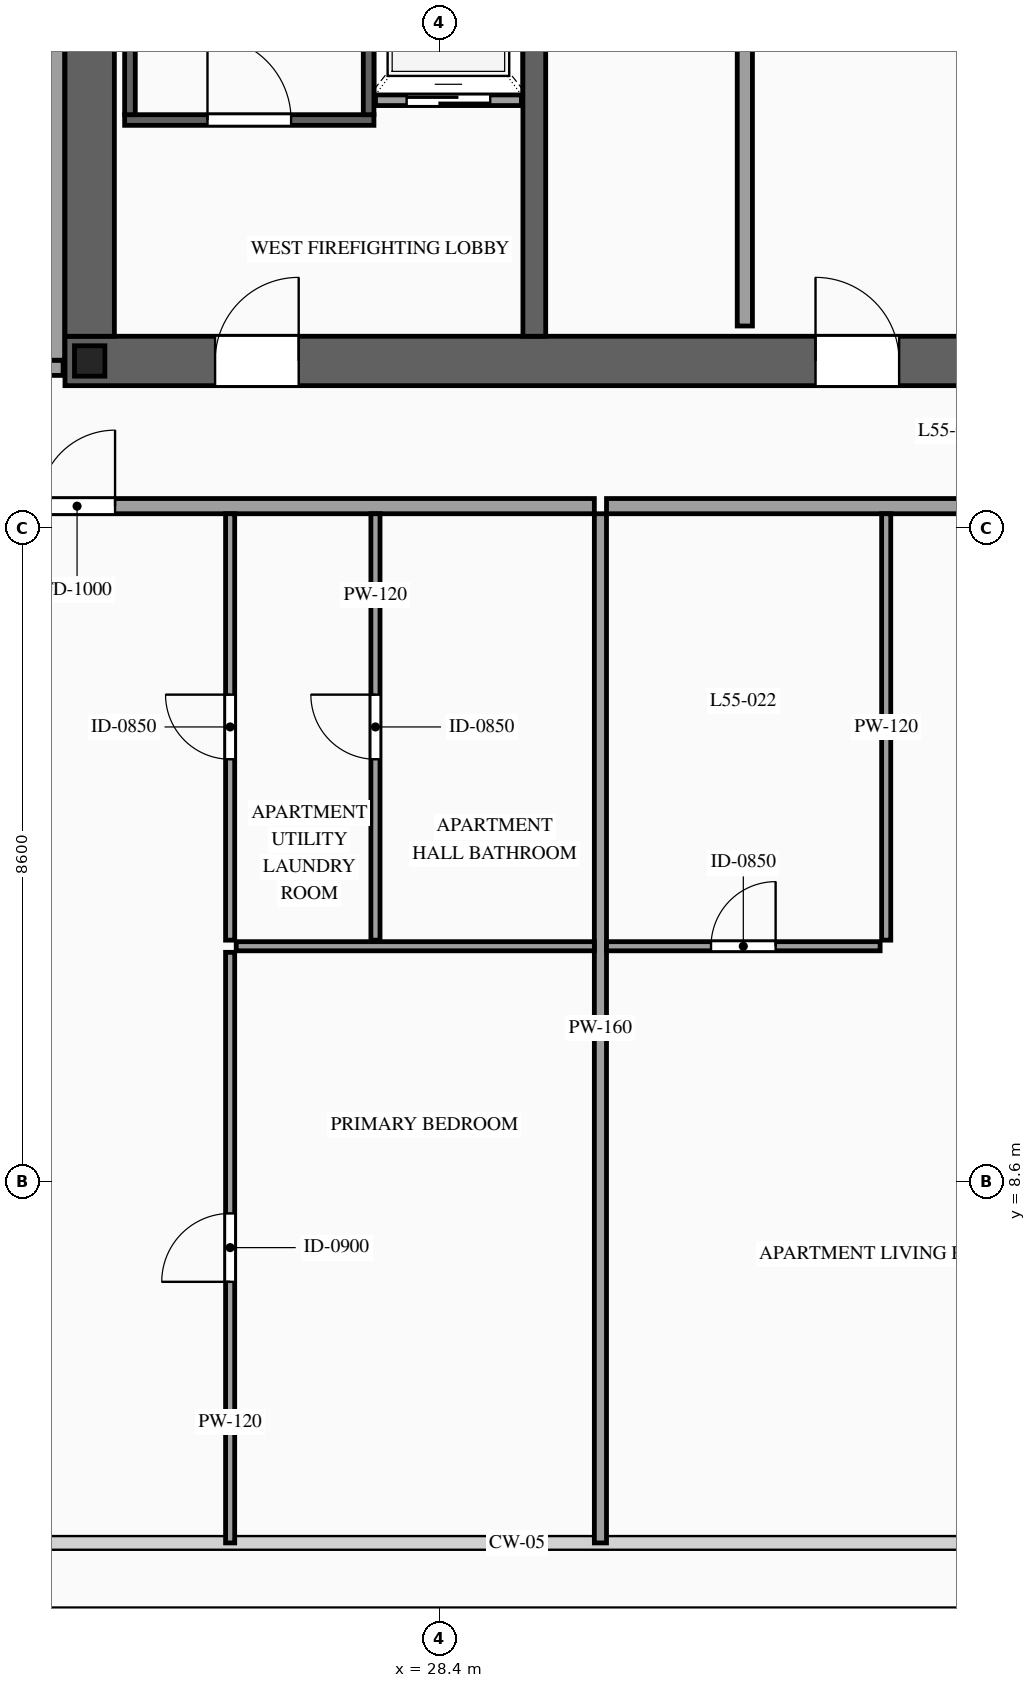
"""IFC4 building model, lengths in metres.
Left out: names, types, materials, properties, quantities, classifications, styles, units other than length and angle.
Written with IfcOpenShell. Run it as: python <this file> out.ifc"""

import sys

from ifc_helpers import new_model, si_unit, direction, frame, frame_2d, origin, origin_2d, place, context, subcontext, project, spatial, rectangle, i_section, extrude, source, transform, mapped, element, fill, save


model = new_model("IFC4")
c1 = context("Model", 3, precision=1e-05, world=origin(), true_north=direction((0.0, 1.0)))
c2 = subcontext(c1, "Body", "Model", "MODEL_VIEW")
j1 = project(units=[si_unit("LENGTHUNIT", "METRE"), si_unit("PLANEANGLEUNIT", "RADIAN")], contexts=[c1])
p1 = place(None, origin())
s1 = spatial("IfcSite", under=j1, at=p1, CompositionType="ELEMENT")
p2 = place(p1, origin())
s2 = spatial("IfcBuilding", under=s1, at=p2, CompositionType="ELEMENT")
p3 = place(p2, frame((0.0, 0.0, 209.0)))
s3 = spatial("IfcBuildingStorey", under=s2, at=p3, CompositionType="ELEMENT", Elevation=209.0)
p4 = place(p3, frame((23.475, 19.4, 0.0), z_axis=(0.0, 0.0, 1.0), x_axis=(1.0, 0.0, 0.0)))
e1 = element("IfcWall", 1, at=p4, inside=s3, PredefinedType="SHEAR", context=c2, shape_type="SweptSolid", body=[
    extrude(rectangle(XDim=27.05, YDim=0.65, at=frame_2d((13.525, 0.0))), origin(), (0.0, 0.0, 1.0), 3.5),
])
p5 = place(p4, frame((1.975, 0.0, 0.0)))
e2 = element("IfcOpeningElement", 2, at=p5, cuts=e1, PredefinedType="OPENING", context=c2, shape_type="SweptSolid", body=[
    extrude(rectangle(XDim=1.1, YDim=2.2, at=frame_2d((0.55, 1.1))), frame((0.0, 0.34, 0.0), z_axis=(0.0, -1.0, 0.0), x_axis=(1.0, 0.0, 0.0)), (0.0, 0.0, 1.0), 0.68),
])
p6 = place(p4, frame((9.875, 0.0, 0.0)))
e3 = element("IfcOpeningElement", 3, at=p6, cuts=e1, PredefinedType="OPENING", context=c2, shape_type="SweptSolid", body=[
    extrude(rectangle(XDim=1.1, YDim=2.2, at=frame_2d((0.55, 1.1))), frame((0.0, 0.34, 0.0), z_axis=(0.0, -1.0, 0.0), x_axis=(1.0, 0.0, 0.0)), (0.0, 0.0, 1.0), 0.68),
])
p7 = place(p4, frame((23.075, 0.0, 0.0)))
e4 = element("IfcOpeningElement", 4, at=p7, cuts=e1, PredefinedType="OPENING", context=c2, shape_type="SweptSolid", body=[
    extrude(rectangle(XDim=1.1, YDim=2.2, at=frame_2d((0.55, 1.1))), frame((0.0, 0.34, 0.0), z_axis=(0.0, -1.0, 0.0), x_axis=(1.0, 0.0, 0.0)), (0.0, 0.0, 1.0), 0.68),
])
p8 = place(p4, frame((19.695, 0.0, 0.0)))
e5 = element("IfcOpeningElement", 5, at=p8, cuts=e1, PredefinedType="OPENING", context=c2, shape_type="SweptSolid", body=[
    extrude(rectangle(XDim=0.9, YDim=2.15, at=frame_2d((0.45, 1.075))), frame((0.0, 0.34, 0.0), z_axis=(0.0, -1.0, 0.0), x_axis=(1.0, 0.0, 0.0)), (0.0, 0.0, 1.0), 0.68),
])
p9 = place(p4, frame((18.255, 0.0, 0.0)))
e6 = element("IfcOpeningElement", 6, at=p9, cuts=e1, PredefinedType="OPENING", context=c2, shape_type="SweptSolid", body=[
    extrude(rectangle(XDim=0.9, YDim=2.15, at=frame_2d((0.45, 1.075))), frame((0.0, 0.34, 0.0), z_axis=(0.0, -1.0, 0.0), x_axis=(1.0, 0.0, 0.0)), (0.0, 0.0, 1.0), 0.68),
])
m1 = source(origin(), c2, "Body", "SweptSolid", [
    extrude(rectangle(XDim=12.15, YDim=0.65, at=frame_2d((6.075, 0.0))), origin(), (0.0, 0.0, 1.0), 3.5),
])
p10 = place(p3, frame((23.8, 19.725, 0.0), z_axis=(0.0, 0.0, 1.0), x_axis=(0.0, 1.0, 0.0)))
e7 = element("IfcWall", 7, at=p10, inside=s3, PredefinedType="SHEAR", context=c2, shape_type="MappedRepresentation", body=[
    mapped(m1, transform((0.0, 0.0, 0.0), scale=1.0)),
])
m2 = source(origin(), c2, "Body", "SweptSolid", [
    extrude(rectangle(XDim=12.15, YDim=0.3, at=frame_2d((6.075, 0.0))), origin(), (0.0, 0.0, 1.0), 3.5),
])
p11 = place(p3, frame((29.65, 19.725, 0.0), z_axis=(0.0, 0.0, 1.0), x_axis=(0.0, 1.0, 0.0)))
e8 = element("IfcWall", 8, at=p11, inside=s3, PredefinedType="SOLIDWALL", context=c2, shape_type="MappedRepresentation", body=[
    mapped(m2, transform((0.0, 0.0, 0.0), scale=1.0)),
])
m3 = source(origin(), c2, "Body", "SweptSolid", [
    extrude(i_section(OverallWidth=0.4, OverallDepth=0.4, WebThickness=0.013, FlangeThickness=0.021, at=origin_2d()), origin(), (0.0, 0.0, 1.0), 3.5),
])
p12 = place(p3, frame((23.8, 19.4, 0.0), z_axis=(0.0, 0.0, 1.0), x_axis=(1.0, 0.0, 0.0)))
e9 = element("IfcColumn", 9, at=p12, inside=s3, PredefinedType="COLUMN", context=c2, shape_type="MappedRepresentation", body=[
    mapped(m3, transform((0.0, 0.0, 0.0), scale=1.0)),
])
p13 = place(p3, frame((27.56, 22.83, 0.0), z_axis=(0.0, 0.0, 1.0), x_axis=(1.0, 0.0, 0.0)))
e10 = element("IfcWall", 10, at=p13, inside=s3, PredefinedType="SOLIDWALL", context=c2, shape_type="SweptSolid", body=[
    extrude(rectangle(XDim=1.92, YDim=0.14, at=frame_2d((0.96, 0.0))), origin(), (0.0, 0.0, 1.0), 3.28),
])
p14 = place(p13, frame((0.41, 0.0, 0.0)))
e11 = element("IfcOpeningElement", 11, at=p14, cuts=e10, PredefinedType="OPENING", context=c2, shape_type="SweptSolid", body=[
    extrude(rectangle(XDim=1.1, YDim=2.2, at=frame_2d((0.55, 1.1))), frame((0.0, 0.085, 0.0), z_axis=(0.0, -1.0, 0.0), x_axis=(1.0, 0.0, 0.0)), (0.0, 0.0, 1.0), 0.17),
])
p15 = place(p3, frame((24.26, 22.57, 0.0), z_axis=(0.0, 0.0, 1.0), x_axis=(1.0, 0.0, 0.0)))
e12 = element("IfcWall", 12, at=p15, inside=s3, PredefinedType="SOLIDWALL", context=c2, shape_type="SweptSolid", body=[
    extrude(rectangle(XDim=3.28, YDim=0.14, at=frame_2d((1.64, 0.0))), origin(), (0.0, 0.0, 1.0), 3.28),
])
p16 = place(p15, frame((1.09, 0.0, 0.0)))
e13 = element("IfcOpeningElement", 13, at=p16, cuts=e12, PredefinedType="OPENING", context=c2, shape_type="SweptSolid", body=[
    extrude(rectangle(XDim=1.1, YDim=2.2, at=frame_2d((0.55, 1.1))), frame((0.0, 0.085, 0.0), z_axis=(0.0, -1.0, 0.0), x_axis=(1.0, 0.0, 0.0)), (0.0, 0.0, 1.0), 0.17),
])
m4 = source(origin(), c2, "Body", "SweptSolid", [
    extrude(rectangle(XDim=8.94, YDim=0.14, at=frame_2d((4.47, 0.0))), origin(), (0.0, 0.0, 1.0), 3.28),
])
for number, where, z_axis, x_axis in (
    (14, (24.33, 22.64, 0.0), (0.0, 0.0, 1.0), (0.0, 1.0, 0.0)),
    (15, (27.47, 22.64, 0.0), (0.0, 0.0, 1.0), (0.0, 1.0, 0.0)),
):
    element("IfcWall", number, at=place(p3, frame(where, z_axis=z_axis, x_axis=x_axis)), inside=s3, PredefinedType="SOLIDWALL", context=c2, shape_type="MappedRepresentation", body=[
        mapped(m4, transform((0.0, 0.0, 0.0), scale=1.0)),
    ])
p17 = place(p3, frame((32.42, 19.86, 0.0), z_axis=(0.0, 0.0, 1.0), x_axis=(0.0, 1.0, 0.0)))
e16 = element("IfcWall", 16, at=p17, inside=s3, PredefinedType="PARTITIONING", context=c2, shape_type="SweptSolid", body=[
    extrude(rectangle(XDim=11.88, YDim=0.2, at=frame_2d((5.94, 0.0))), origin(), (0.0, 0.0, 1.0), 3.28),
])
p18 = place(p17, frame((5.49, 0.0, 0.0)))
e17 = element("IfcOpeningElement", 17, at=p18, cuts=e16, PredefinedType="OPENING", context=c2, shape_type="SweptSolid", body=[
    extrude(rectangle(XDim=0.9, YDim=2.15, at=frame_2d((0.45, 1.075))), frame((0.0, 0.115, 0.0), z_axis=(0.0, -1.0, 0.0), x_axis=(1.0, 0.0, 0.0)), (0.0, 0.0, 1.0), 0.23),
])
p19 = place(p3, frame((17.94, 17.49, 0.0), z_axis=(0.0, 0.0, 1.0), x_axis=(1.0, 0.0, 0.0)))
e18 = element("IfcWall", 18, at=p19, inside=s3, PredefinedType="PARTITIONING", context=c2, shape_type="SweptSolid", body=[
    extrude(rectangle(XDim=12.5, YDim=0.2, at=frame_2d((6.25, 0.0))), origin(), (0.0, 0.0, 1.0), 3.28),
])
p20 = place(p19, frame((5.194, 0.0, 0.0)))
e19 = element("IfcOpeningElement", 19, at=p20, cuts=e18, PredefinedType="OPENING", context=c2, shape_type="SweptSolid", body=[
    extrude(rectangle(XDim=1.0, YDim=2.2, at=frame_2d((0.5, 1.1))), frame((0.0, 0.115, 0.0), z_axis=(0.0, -1.0, 0.0), x_axis=(1.0, 0.0, 0.0)), (0.0, 0.0, 1.0), 0.23),
])
m5 = source(origin(), c2, "Body", "SweptSolid", [
    extrude(rectangle(XDim=13.54, YDim=0.16, at=frame_2d((6.77, 0.0))), origin(), (0.0, 0.0, 1.0), 3.28),
])
p21 = place(p3, frame((30.52, 3.85, 0.0), z_axis=(0.0, 0.0, 1.0), x_axis=(0.0, 1.0, 0.0)))
e20 = element("IfcWall", 20, at=p21, inside=s3, PredefinedType="PARTITIONING", context=c2, shape_type="MappedRepresentation", body=[
    mapped(m5, transform((0.0, 0.0, 0.0), scale=1.0)),
])
p22 = place(p3, frame((27.56, 11.78, 0.0), z_axis=(0.0, 0.0, 1.0), x_axis=(0.0, 1.0, 0.0)))
e21 = element("IfcWall", 21, at=p22, inside=s3, PredefinedType="PARTITIONING", context=c2, shape_type="SweptSolid", body=[
    extrude(rectangle(XDim=5.61, YDim=0.12, at=frame_2d((2.805, 0.0))), origin(), (0.0, 0.0, 1.0), 3.28),
])
p23 = place(p22, frame((2.38, 0.0, 0.0)))
e22 = element("IfcOpeningElement", 22, at=p23, cuts=e21, PredefinedType="OPENING", context=c2, shape_type="SweptSolid", body=[
    extrude(rectangle(XDim=0.85, YDim=2.1, at=frame_2d((0.425, 1.05))), frame((0.0, 0.075, 0.0), z_axis=(0.0, -1.0, 0.0), x_axis=(1.0, 0.0, 0.0)), (0.0, 0.0, 1.0), 0.15),
])
m6 = source(origin(), c2, "Body", "SweptSolid", [
    extrude(rectangle(XDim=4.712, YDim=0.12, at=frame_2d((2.356, 0.0))), origin(), (0.0, 0.0, 1.0), 2.875),
])
p24 = place(p3, frame((25.728, 11.7, 0.0), z_axis=(0.0, 0.0, 1.0), x_axis=(1.0, 0.0, 0.0)))
e23 = element("IfcWall", 23, at=p24, inside=s3, PredefinedType="PARTITIONING", context=c2, shape_type="MappedRepresentation", body=[
    mapped(m6, transform((0.0, 0.0, 0.0), scale=1.0)),
])
p25 = place(p3, frame((25.648, 3.85, 0.0), z_axis=(0.0, 0.0, 1.0), x_axis=(0.0, 1.0, 0.0)))
e24 = element("IfcWall", 24, at=p25, inside=s3, PredefinedType="PARTITIONING", context=c2, shape_type="SweptSolid", body=[
    extrude(rectangle(XDim=7.77, YDim=0.12, at=frame_2d((3.885, 0.0))), origin(), (0.0, 0.0, 1.0), 3.28),
])
p26 = place(p25, frame((3.435, 0.0, 0.0)))
e25 = element("IfcOpeningElement", 25, at=p26, cuts=e24, PredefinedType="OPENING", context=c2, shape_type="SweptSolid", body=[
    extrude(rectangle(XDim=0.9, YDim=2.15, at=frame_2d((0.45, 1.075))), frame((0.0, 0.075, 0.0), z_axis=(0.0, -1.0, 0.0), x_axis=(1.0, 0.0, 0.0)), (0.0, 0.0, 1.0), 0.15),
])
p27 = place(p3, frame((25.648, 11.78, 0.0), z_axis=(0.0, 0.0, 1.0), x_axis=(0.0, 1.0, 0.0)))
e26 = element("IfcWall", 26, at=p27, inside=s3, PredefinedType="PARTITIONING", context=c2, shape_type="SweptSolid", body=[
    extrude(rectangle(XDim=5.61, YDim=0.12, at=frame_2d((2.805, 0.0))), origin(), (0.0, 0.0, 1.0), 3.28),
])
p28 = place(p27, frame((2.38, 0.0, 0.0)))
e27 = element("IfcOpeningElement", 27, at=p28, cuts=e26, PredefinedType="OPENING", context=c2, shape_type="SweptSolid", body=[
    extrude(rectangle(XDim=0.85, YDim=2.1, at=frame_2d((0.425, 1.05))), frame((0.0, 0.075, 0.0), z_axis=(0.0, -1.0, 0.0), x_axis=(1.0, 0.0, 0.0)), (0.0, 0.0, 1.0), 0.15),
])
p29 = place(p3, frame((30.6, 17.49, 0.0), z_axis=(0.0, 0.0, 1.0), x_axis=(1.0, 0.0, 0.0)))
e28 = element("IfcWall", 28, at=p29, inside=s3, PredefinedType="PARTITIONING", context=c2, shape_type="SweptSolid", body=[
    extrude(rectangle(XDim=12.8, YDim=0.2, at=frame_2d((6.4, 0.0))), origin(), (0.0, 0.0, 1.0), 3.28),
])
p30 = place(p29, frame((5.344, 0.0, 0.0)))
e29 = element("IfcOpeningElement", 29, at=p30, cuts=e28, PredefinedType="OPENING", context=c2, shape_type="SweptSolid", body=[
    extrude(rectangle(XDim=1.0, YDim=2.2, at=frame_2d((0.5, 1.1))), frame((0.0, 0.115, 0.0), z_axis=(0.0, -1.0, 0.0), x_axis=(1.0, 0.0, 0.0)), (0.0, 0.0, 1.0), 0.23),
])
p31 = place(p3, frame((30.6, 11.7, 0.0), z_axis=(0.0, 0.0, 1.0), x_axis=(1.0, 0.0, 0.0)))
e30 = element("IfcWall", 30, at=p31, inside=s3, PredefinedType="PARTITIONING", context=c2, shape_type="SweptSolid", body=[
    extrude(rectangle(XDim=3.6, YDim=0.12, at=frame_2d((1.8, 0.0))), origin(), (0.0, 0.0, 1.0), 2.875),
])
p32 = place(p31, frame((1.375, 0.0, 0.0)))
e31 = element("IfcOpeningElement", 31, at=p32, cuts=e30, PredefinedType="OPENING", context=c2, shape_type="SweptSolid", body=[
    extrude(rectangle(XDim=0.85, YDim=2.1, at=frame_2d((0.425, 1.05))), frame((0.0, 0.075, 0.0), z_axis=(0.0, -1.0, 0.0), x_axis=(1.0, 0.0, 0.0)), (0.0, 0.0, 1.0), 0.15),
])
m7 = source(origin(), c2, "Body", "SweptSolid", [
    extrude(rectangle(XDim=5.61, YDim=0.12, at=frame_2d((2.805, 0.0))), origin(), (0.0, 0.0, 1.0), 3.28),
])
p33 = place(p3, frame((34.28, 11.78, 0.0), z_axis=(0.0, 0.0, 1.0), x_axis=(0.0, 1.0, 0.0)))
e32 = element("IfcWall", 32, at=p33, inside=s3, PredefinedType="PARTITIONING", context=c2, shape_type="MappedRepresentation", body=[
    mapped(m7, transform((0.0, 0.0, 0.0), scale=1.0)),
])
m8 = source(origin(), c2, "Body", "SweptSolid", [
    extrude(rectangle(XDim=8.4, YDim=0.2, at=frame_2d((4.2, 0.0))), origin(), (0.0, 0.0, 1.0), 2.775),
])
p34 = place(p3, frame((15.05, 19.31, 0.0), z_axis=(0.0, 0.0, 1.0), x_axis=(1.0, 0.0, 0.0)))
e33 = element("IfcWall", 33, at=p34, inside=s3, PredefinedType="PARTITIONING", context=c2, shape_type="MappedRepresentation", body=[
    mapped(m8, transform((0.0, 0.0, 0.0), scale=1.0)),
])
m9 = source(origin(), c2, "Body", "SweptSolid", [
    extrude(rectangle(XDim=12.78, YDim=0.2, at=frame_2d((6.39, 0.0))), origin(), (0.0, 0.0, 1.0), 3.28),
])
p35 = place(p3, frame((23.37, 19.41, 0.0), z_axis=(0.0, 0.0, 1.0), x_axis=(0.0, 1.0, 0.0)))
e34 = element("IfcWall", 34, at=p35, inside=s3, PredefinedType="PARTITIONING", context=c2, shape_type="MappedRepresentation", body=[
    mapped(m9, transform((0.0, 0.0, 0.0), scale=1.0)),
])
m10 = source(origin(), c2, "Body", "SweptSolid", [
    extrude(rectangle(XDim=1.1, YDim=2.2, at=frame_2d((0.55, 1.1))), frame((0.0, 0.025, 0.0), z_axis=(0.0, -1.0, 0.0), x_axis=(1.0, 0.0, 0.0)), (0.0, 0.0, 1.0), 0.05),
])
p36 = place(p14, origin())
e35 = element("IfcDoor", 35, at=p36, inside=s3, OperationType="SLIDING_TO_LEFT", PredefinedType="DOOR", context=c2, shape_type="MappedRepresentation", body=[
    mapped(m10, transform((0.0, 0.0, 0.0), scale=1.0)),
])
fill(e11, e35)
m11 = source(origin(), c2, "Body", "SweptSolid", [
    extrude(rectangle(XDim=1.1, YDim=2.2, at=frame_2d((0.55, 1.1))), frame((0.0, 0.025, 0.0), z_axis=(0.0, -1.0, 0.0), x_axis=(1.0, 0.0, 0.0)), (0.0, 0.0, 1.0), 0.05),
])
p37 = place(p16, origin())
e36 = element("IfcDoor", 36, at=p37, inside=s3, OperationType="SINGLE_SWING_LEFT", PredefinedType="DOOR", context=c2, shape_type="MappedRepresentation", body=[
    mapped(m11, transform((0.0, 0.0, 0.0), scale=1.0)),
])
fill(e13, e36)
p38 = place(p5, origin())
e37 = element("IfcDoor", 37, at=p38, inside=s3, OperationType="SINGLE_SWING_RIGHT", PredefinedType="DOOR", context=c2, shape_type="MappedRepresentation", body=[
    mapped(m11, transform((0.0, 0.0, 0.0), scale=1.0)),
])
fill(e2, e37)
p39 = place(p6, origin())
e38 = element("IfcDoor", 38, at=p39, inside=s3, OperationType="SINGLE_SWING_LEFT", PredefinedType="DOOR", context=c2, shape_type="MappedRepresentation", body=[
    mapped(m11, transform((0.0, 0.0, 0.0), scale=1.0)),
])
fill(e3, e38)
m12 = source(origin(), c2, "Body", "SweptSolid", [
    extrude(rectangle(XDim=1.0, YDim=2.2, at=frame_2d((0.5, 1.1))), frame((0.0, 0.025, 0.0), z_axis=(0.0, -1.0, 0.0), x_axis=(1.0, 0.0, 0.0)), (0.0, 0.0, 1.0), 0.05),
])
p40 = place(p20, origin())
e39 = element("IfcDoor", 39, at=p40, inside=s3, OperationType="SINGLE_SWING_RIGHT", PredefinedType="DOOR", context=c2, shape_type="MappedRepresentation", body=[
    mapped(m12, transform((0.0, 0.0, 0.0), scale=1.0)),
])
fill(e19, e39)
m13 = source(origin(), c2, "Body", "SweptSolid", [
    extrude(rectangle(XDim=0.85, YDim=2.1, at=frame_2d((0.425, 1.05))), frame((0.0, 0.025, 0.0), z_axis=(0.0, -1.0, 0.0), x_axis=(1.0, 0.0, 0.0)), (0.0, 0.0, 1.0), 0.05),
])
p41 = place(p23, origin())
e40 = element("IfcDoor", 40, at=p41, inside=s3, OperationType="SINGLE_SWING_RIGHT", PredefinedType="DOOR", context=c2, shape_type="MappedRepresentation", body=[
    mapped(m13, transform((0.0, 0.0, 0.0), scale=1.0)),
])
fill(e22, e40)
m14 = source(origin(), c2, "Body", "SweptSolid", [
    extrude(rectangle(XDim=0.9, YDim=2.15, at=frame_2d((0.45, 1.075))), frame((0.0, 0.025, 0.0), z_axis=(0.0, -1.0, 0.0), x_axis=(1.0, 0.0, 0.0)), (0.0, 0.0, 1.0), 0.05),
])
p42 = place(p26, origin())
e41 = element("IfcDoor", 41, at=p42, inside=s3, OperationType="SINGLE_SWING_LEFT", PredefinedType="DOOR", context=c2, shape_type="MappedRepresentation", body=[
    mapped(m14, transform((0.0, 0.0, 0.0), scale=1.0)),
])
fill(e25, e41)
p43 = place(p28, origin())
e42 = element("IfcDoor", 42, at=p43, inside=s3, OperationType="SINGLE_SWING_RIGHT", PredefinedType="DOOR", context=c2, shape_type="MappedRepresentation", body=[
    mapped(m13, transform((0.0, 0.0, 0.0), scale=1.0)),
])
fill(e27, e42)
p44 = place(p32, origin())
e43 = element("IfcDoor", 43, at=p44, inside=s3, OperationType="SINGLE_SWING_RIGHT", PredefinedType="DOOR", context=c2, shape_type="MappedRepresentation", body=[
    mapped(m13, transform((0.0, 0.0, 0.0), scale=1.0)),
])
fill(e31, e43)
save(model, sys.argv[1])
